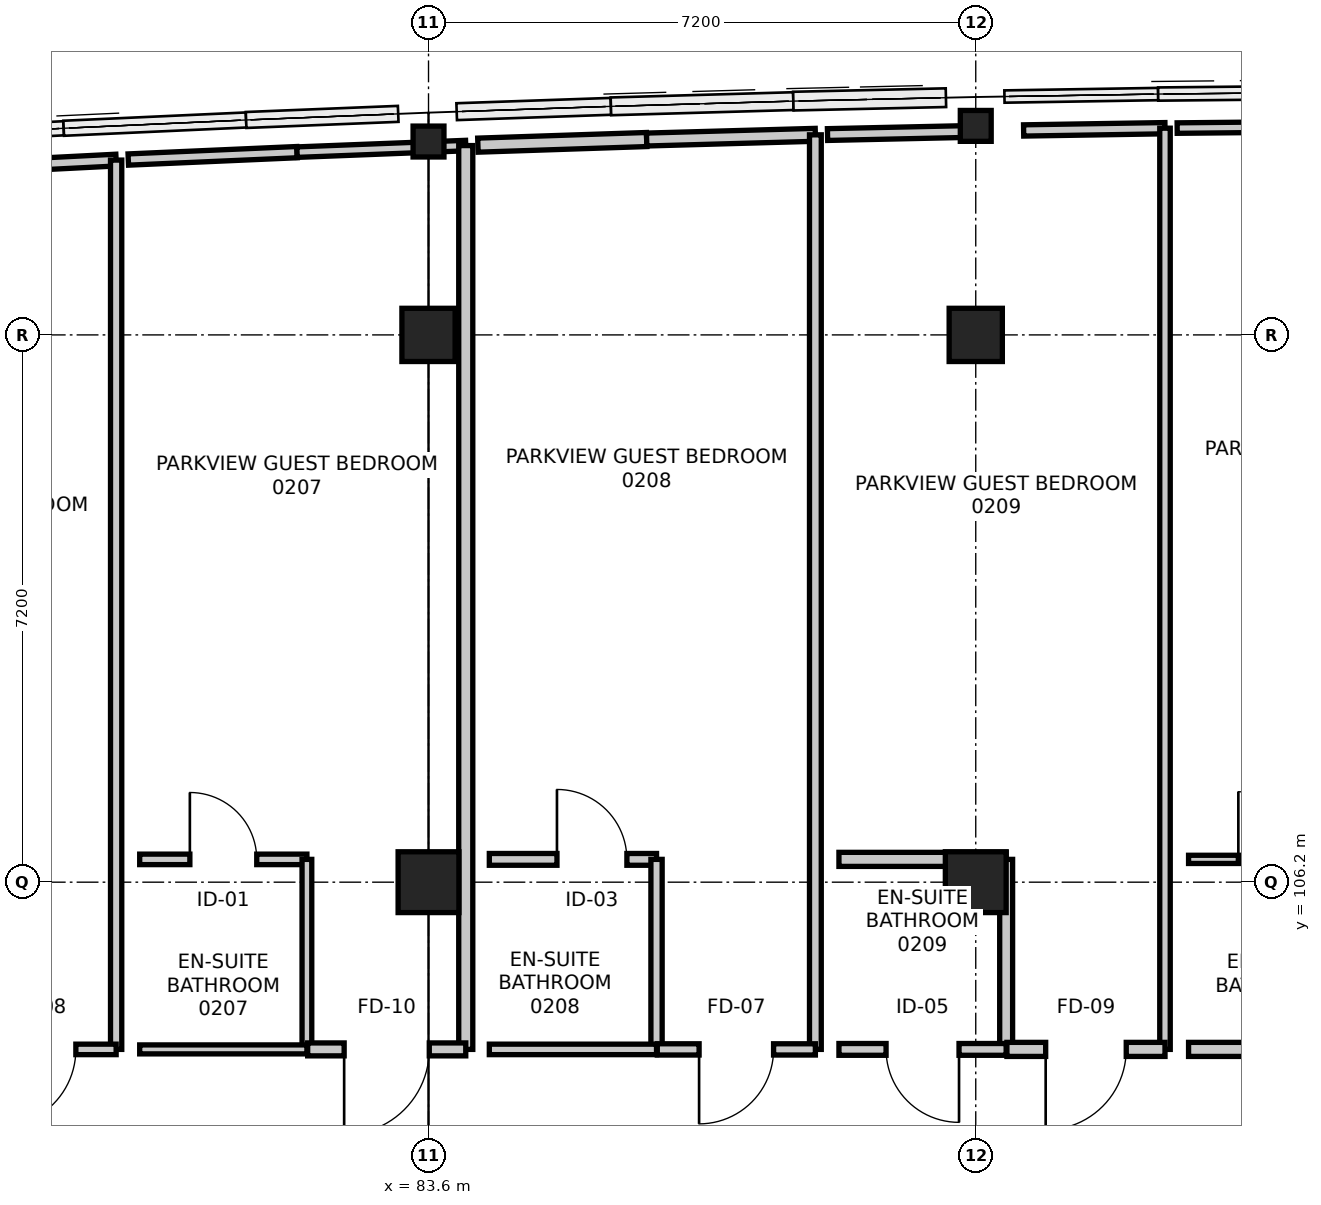
"""IFC4 building model, lengths in metres.
Left out: names, types, materials, properties, quantities, classifications, styles, units other than length and angle.
Written with IfcOpenShell. Run it as: python <this file> out.ifc"""

import sys

from ifc_helpers import new_model, si_unit, direction, frame, frame_2d, origin, origin_2d, place, context, subcontext, project, spatial, rectangle, hollow_circle, extrude, element, fill, save


model = new_model("IFC4")
c1 = context("Model", 3, precision=1e-05, world=origin(), true_north=direction((0.0, 1.0)))
c2 = subcontext(c1, "Body", "Model", "MODEL_VIEW")
j1 = project(units=[si_unit("LENGTHUNIT", "METRE"), si_unit("PLANEANGLEUNIT", "RADIAN")], contexts=[c1])
p1 = place(None, origin())
s1 = spatial("IfcSite", under=j1, at=p1, CompositionType="ELEMENT")
p2 = place(p1, origin())
s2 = spatial("IfcBuilding", under=s1, at=p2, CompositionType="ELEMENT")
p3 = place(p2, frame((0.0, 0.0, 10.5)))
s3 = spatial("IfcBuildingStorey", under=s2, at=p3, CompositionType="ELEMENT", Elevation=10.5)
p4 = place(p3, frame((83.6, 106.2, -0.32), z_axis=(0.0, 0.0, 1.0), x_axis=(1.0, 0.0, 0.0)))
e1 = element("IfcColumn", 1, at=p4, inside=s3, PredefinedType="COLUMN", context=c2, shape_type="SweptSolid", body=[
    extrude(rectangle(XDim=0.8, YDim=0.8, at=origin_2d()), origin(), (0.0, 0.0, 1.0), 4.82),
])
p5 = place(p3, frame((83.6, 113.4, 0.0), z_axis=(0.0, 0.0, 1.0), x_axis=(1.0, 0.0, 0.0)))
e2 = element("IfcColumn", 2, at=p5, inside=s3, PredefinedType="COLUMN", context=c2, shape_type="SweptSolid", body=[
    extrude(rectangle(XDim=0.7, YDim=0.7, at=origin_2d()), origin(), (0.0, 0.0, 1.0), 4.5),
])
p6 = place(p3, frame((83.6, 115.944, 0.0), z_axis=(0.0, 0.0, 1.0), x_axis=(1.0, 0.0, 0.0)))
e3 = element("IfcColumn", 3, at=p6, inside=s3, PredefinedType="COLUMN", context=c2, shape_type="SweptSolid", body=[
    extrude(hollow_circle(Radius=0.203, WallThickness=0.02, at=origin_2d()), origin(), (0.0, 0.0, 1.0), 4.5),
])
p7 = place(p3, frame((90.8, 106.2, 0.0), z_axis=(0.0, 0.0, 1.0), x_axis=(1.0, 0.0, 0.0)))
e4 = element("IfcColumn", 4, at=p7, inside=s3, PredefinedType="COLUMN", context=c2, shape_type="SweptSolid", body=[
    extrude(rectangle(XDim=0.8, YDim=0.8, at=origin_2d()), origin(), (0.0, 0.0, 1.0), 4.5),
])
p8 = place(p3, frame((90.8, 113.4, 0.0), z_axis=(0.0, 0.0, 1.0), x_axis=(1.0, 0.0, 0.0)))
e5 = element("IfcColumn", 5, at=p8, inside=s3, PredefinedType="COLUMN", context=c2, shape_type="SweptSolid", body=[
    extrude(rectangle(XDim=0.7, YDim=0.7, at=origin_2d()), origin(), (0.0, 0.0, 1.0), 4.5),
])
p9 = place(p3, frame((90.8, 116.15, 0.0), z_axis=(0.0, 0.0, 1.0), x_axis=(1.0, 0.0, 0.0)))
e6 = element("IfcColumn", 6, at=p9, inside=s3, PredefinedType="COLUMN", context=c2, shape_type="SweptSolid", body=[
    extrude(hollow_circle(Radius=0.203, WallThickness=0.02, at=origin_2d()), origin(), (0.0, 0.0, 1.0), 4.5),
])
p10 = place(p3, frame((75.05, 115.473, 0.0), z_axis=(0.0, 0.0, 1.0), x_axis=(0.998700595236, 0.050961957131, 0.0)))
e7 = element("IfcWall", 7, at=p10, inside=s3, PredefinedType="PARTITIONING", context=c2, shape_type="SweptSolid", body=[
    extrude(rectangle(XDim=4.446, YDim=0.155, at=frame_2d((2.223, 0.0))), origin(), (0.0, 0.0, 1.0), 3.796),
])
p11 = place(p3, frame((79.49, 115.7, 0.0), z_axis=(0.0, 0.0, 1.0), x_axis=(0.0, -1.0, 0.0)))
e8 = element("IfcWall", 8, at=p11, inside=s3, PredefinedType="PARTITIONING", context=c2, shape_type="SweptSolid", body=[
    extrude(rectangle(XDim=11.7, YDim=0.148, at=frame_2d((5.85, 0.0))), origin(), (0.0, 0.0, 1.0), 3.455),
])
p12 = place(p3, frame((79.49, 104.0, 0.0), z_axis=(0.0, 0.0, 1.0), x_axis=(-1.0, 0.0, 0.0)))
e9 = element("IfcWall", 9, at=p12, inside=s3, PredefinedType="PARTITIONING", context=c2, shape_type="SweptSolid", body=[
    extrude(rectangle(XDim=2.08, YDim=0.138, at=frame_2d((1.04, 0.0))), origin(), (0.0, 0.0, 1.0), 4.22),
])
p13 = place(p12, frame((0.53, 0.0, 0.0)))
e10 = element("IfcOpeningElement", 10, at=p13, cuts=e9, PredefinedType="OPENING", context=c2, shape_type="SweptSolid", body=[
    extrude(rectangle(XDim=1.02, YDim=2.15, at=frame_2d((0.51, 1.075))), frame((0.0, 0.079, 0.0), z_axis=(0.0, -1.0, 0.0), x_axis=(1.0, 0.0, 0.0)), (0.0, 0.0, 1.0), 0.158),
])
p14 = place(p3, frame((79.8, 106.5, 0.0), z_axis=(0.0, 0.0, 1.0), x_axis=(1.0, 0.0, 0.0)))
e11 = element("IfcWall", 11, at=p14, inside=s3, PredefinedType="PARTITIONING", context=c2, shape_type="SweptSolid", body=[
    extrude(rectangle(XDim=2.2, YDim=0.138, at=frame_2d((1.1, 0.0))), origin(), (0.0, 0.0, 1.0), 3.455),
])
p15 = place(p14, frame((0.66, 0.0, 0.0)))
e12 = element("IfcOpeningElement", 12, at=p15, cuts=e11, PredefinedType="OPENING", context=c2, shape_type="SweptSolid", body=[
    extrude(rectangle(XDim=0.88, YDim=2.06, at=frame_2d((0.44, 1.03))), frame((0.0, 0.079, 0.0), z_axis=(0.0, -1.0, 0.0), x_axis=(1.0, 0.0, 0.0)), (0.0, 0.0, 1.0), 0.158),
])
p16 = place(p3, frame((82.0, 106.5, 0.0), z_axis=(0.0, 0.0, 1.0), x_axis=(0.0, -1.0, 0.0)))
e13 = element("IfcWall", 13, at=p16, inside=s3, PredefinedType="PARTITIONING", context=c2, shape_type="SweptSolid", body=[
    extrude(rectangle(XDim=2.5, YDim=0.128, at=frame_2d((1.25, 0.0))), origin(), (0.0, 0.0, 1.0), 3.455),
])
p17 = place(p3, frame((82.0, 104.0, 0.0), z_axis=(0.0, 0.0, 1.0), x_axis=(-1.0, 0.0, 0.0)))
e14 = element("IfcWall", 14, at=p17, inside=s3, PredefinedType="PARTITIONING", context=c2, shape_type="SweptSolid", body=[
    extrude(rectangle(XDim=2.2, YDim=0.118, at=frame_2d((1.1, 0.0))), origin(), (0.0, 0.0, 1.0), 4.22),
])
p18 = place(p3, frame((79.65, 115.707, 0.0), z_axis=(0.0, 0.0, 1.0), x_axis=(0.999038875986, 0.043832913077, 0.0)))
e15 = element("IfcWall", 15, at=p18, inside=s3, PredefinedType="PARTITIONING", context=c2, shape_type="SweptSolid", body=[
    extrude(rectangle(XDim=2.222, YDim=0.148, at=frame_2d((1.111, 0.0))), origin(), (0.0, 0.0, 1.0), 3.796),
])
p19 = place(p3, frame((81.87, 115.804, 0.0), z_axis=(0.0, 0.0, 1.0), x_axis=(0.999243047169, 0.038901576894, 0.0)))
e16 = element("IfcWall", 16, at=p19, inside=s3, PredefinedType="PARTITIONING", context=c2, shape_type="SweptSolid", body=[
    extrude(rectangle(XDim=2.222, YDim=0.138, at=frame_2d((1.111, 0.0))), origin(), (0.0, 0.0, 1.0), 3.796),
])
p20 = place(p3, frame((84.09, 115.891, 0.0), z_axis=(0.0, 0.0, 1.0), x_axis=(0.0, -1.0, 0.0)))
e17 = element("IfcWall", 17, at=p20, inside=s3, PredefinedType="PARTITIONING", context=c2, shape_type="SweptSolid", body=[
    extrude(rectangle(XDim=11.891, YDim=0.185, at=frame_2d((5.945, 0.0))), origin(), (0.0, 0.0, 1.0), 3.455),
])
p21 = place(p3, frame((84.09, 104.0, 0.0), z_axis=(0.0, 0.0, 1.0), x_axis=(-1.0, 0.0, 0.0)))
e18 = element("IfcWall", 18, at=p21, inside=s3, PredefinedType="PARTITIONING", context=c2, shape_type="SweptSolid", body=[
    extrude(rectangle(XDim=2.08, YDim=0.17, at=frame_2d((1.04, 0.0))), origin(), (0.0, 0.0, 1.0), 3.555),
])
p22 = place(p21, frame((0.48, 0.0, 0.0)))
e19 = element("IfcOpeningElement", 19, at=p22, cuts=e18, PredefinedType="OPENING", context=c2, shape_type="SweptSolid", body=[
    extrude(rectangle(XDim=1.12, YDim=2.2, at=frame_2d((0.56, 1.1))), frame((0.0, 0.095, 0.0), z_axis=(0.0, -1.0, 0.0), x_axis=(1.0, 0.0, 0.0)), (0.0, 0.0, 1.0), 0.19),
])
p23 = place(p3, frame((84.4, 106.5, 0.0), z_axis=(0.0, 0.0, 1.0), x_axis=(1.0, 0.0, 0.0)))
e20 = element("IfcWall", 20, at=p23, inside=s3, PredefinedType="PARTITIONING", context=c2, shape_type="SweptSolid", body=[
    extrude(rectangle(XDim=2.2, YDim=0.155, at=frame_2d((1.1, 0.0))), origin(), (0.0, 0.0, 1.0), 3.455),
])
p24 = place(p23, frame((0.89, 0.0, 0.0)))
e21 = element("IfcOpeningElement", 21, at=p24, cuts=e20, PredefinedType="OPENING", context=c2, shape_type="SweptSolid", body=[
    extrude(rectangle(XDim=0.92, YDim=2.1, at=frame_2d((0.46, 1.05))), frame((0.0, 0.087, 0.0), z_axis=(0.0, -1.0, 0.0), x_axis=(1.0, 0.0, 0.0)), (0.0, 0.0, 1.0), 0.175),
])
p25 = place(p3, frame((86.6, 106.5, 0.0), z_axis=(0.0, 0.0, 1.0), x_axis=(0.0, -1.0, 0.0)))
e22 = element("IfcWall", 22, at=p25, inside=s3, PredefinedType="PARTITIONING", context=c2, shape_type="SweptSolid", body=[
    extrude(rectangle(XDim=2.5, YDim=0.148, at=frame_2d((1.25, 0.0))), origin(), (0.0, 0.0, 1.0), 3.455),
])
p26 = place(p3, frame((86.6, 104.0, 0.0), z_axis=(0.0, 0.0, 1.0), x_axis=(-1.0, 0.0, 0.0)))
e23 = element("IfcWall", 23, at=p26, inside=s3, PredefinedType="PARTITIONING", context=c2, shape_type="SweptSolid", body=[
    extrude(rectangle(XDim=2.2, YDim=0.138, at=frame_2d((1.1, 0.0))), origin(), (0.0, 0.0, 1.0), 4.22),
])
p27 = place(p3, frame((84.25, 115.896, 0.0), z_axis=(0.0, 0.0, 1.0), x_axis=(0.999445272891, 0.03330385106, 0.0)))
e24 = element("IfcWall", 24, at=p27, inside=s3, PredefinedType="PARTITIONING", context=c2, shape_type="SweptSolid", body=[
    extrude(rectangle(XDim=2.221, YDim=0.185, at=frame_2d((1.111, 0.0))), origin(), (0.0, 0.0, 1.0), 3.796),
])
p28 = place(p3, frame((86.47, 115.97, 0.0), z_axis=(0.0, 0.0, 1.0), x_axis=(0.999613148223, 0.027812836963, 0.0)))
e25 = element("IfcWall", 25, at=p28, inside=s3, PredefinedType="PARTITIONING", context=c2, shape_type="SweptSolid", body=[
    extrude(rectangle(XDim=2.221, YDim=0.17, at=frame_2d((1.11, 0.0))), origin(), (0.0, 0.0, 1.0), 3.796),
])
p29 = place(p3, frame((88.69, 116.032, 0.0), z_axis=(0.0, 0.0, 1.0), x_axis=(0.0, -1.0, 0.0)))
e26 = element("IfcWall", 26, at=p29, inside=s3, PredefinedType="PARTITIONING", context=c2, shape_type="SweptSolid", body=[
    extrude(rectangle(XDim=12.032, YDim=0.155, at=frame_2d((6.016, 0.0))), origin(), (0.0, 0.0, 1.0), 3.455),
])
p30 = place(p3, frame((88.69, 104.0, 0.0), z_axis=(0.0, 0.0, 1.0), x_axis=(-1.0, 0.0, 0.0)))
e27 = element("IfcWall", 27, at=p30, inside=s3, PredefinedType="PARTITIONING", context=c2, shape_type="SweptSolid", body=[
    extrude(rectangle(XDim=2.08, YDim=0.148, at=frame_2d((1.04, 0.0))), origin(), (0.0, 0.0, 1.0), 4.22),
])
p31 = place(p30, frame((0.55, 0.0, 0.0)))
e28 = element("IfcOpeningElement", 28, at=p31, cuts=e27, PredefinedType="OPENING", context=c2, shape_type="SweptSolid", body=[
    extrude(rectangle(XDim=0.98, YDim=2.15, at=frame_2d((0.49, 1.075))), frame((0.0, 0.084, 0.0), z_axis=(0.0, -1.0, 0.0), x_axis=(1.0, 0.0, 0.0)), (0.0, 0.0, 1.0), 0.168),
])
p32 = place(p3, frame((89.0, 106.5, 0.0), z_axis=(0.0, 0.0, 1.0), x_axis=(1.0, 0.0, 0.0)))
e29 = element("IfcWall", 29, at=p32, inside=s3, PredefinedType="PARTITIONING", context=c2, shape_type="SweptSolid", body=[
    extrude(rectangle(XDim=2.2, YDim=0.185, at=frame_2d((1.1, 0.0))), origin(), (0.0, 0.0, 1.0), 3.455),
])
p33 = place(p3, frame((91.2, 106.5, 0.0), z_axis=(0.0, 0.0, 1.0), x_axis=(0.0, -1.0, 0.0)))
e30 = element("IfcWall", 30, at=p33, inside=s3, PredefinedType="PARTITIONING", context=c2, shape_type="SweptSolid", body=[
    extrude(rectangle(XDim=2.5, YDim=0.17, at=frame_2d((1.25, 0.0))), origin(), (0.0, 0.0, 1.0), 3.455),
])
p34 = place(p3, frame((91.2, 104.0, 0.0), z_axis=(0.0, 0.0, 1.0), x_axis=(-1.0, 0.0, 0.0)))
e31 = element("IfcWall", 31, at=p34, inside=s3, PredefinedType="PARTITIONING", context=c2, shape_type="SweptSolid", body=[
    extrude(rectangle(XDim=2.2, YDim=0.155, at=frame_2d((1.1, 0.0))), origin(), (0.0, 0.0, 1.0), 3.555),
])
p35 = place(p34, frame((0.62, 0.0, 0.0)))
e32 = element("IfcOpeningElement", 32, at=p35, cuts=e31, PredefinedType="OPENING", context=c2, shape_type="SweptSolid", body=[
    extrude(rectangle(XDim=0.96, YDim=2.14, at=frame_2d((0.48, 1.07))), frame((0.0, 0.087, 0.0), z_axis=(0.0, -1.0, 0.0), x_axis=(1.0, 0.0, 0.0)), (0.0, 0.0, 1.0), 0.175),
])
p36 = place(p3, frame((88.85, 116.036, 0.0), z_axis=(0.0, 0.0, 1.0), x_axis=(0.999762733925, 0.021782466706, 0.0)))
e33 = element("IfcWall", 33, at=p36, inside=s3, PredefinedType="PARTITIONING", context=c2, shape_type="SweptSolid", body=[
    extrude(rectangle(XDim=1.861, YDim=0.155, at=frame_2d((0.93, 0.0))), origin(), (0.0, 0.0, 1.0), 3.796),
])
p37 = place(p3, frame((91.43, 116.09, 0.0), z_axis=(0.0, 0.0, 1.0), x_axis=(0.999871822968, 0.016010547631, 0.0)))
e34 = element("IfcWall", 34, at=p37, inside=s3, PredefinedType="PARTITIONING", context=c2, shape_type="SweptSolid", body=[
    extrude(rectangle(XDim=1.86, YDim=0.148, at=frame_2d((0.93, 0.0))), origin(), (0.0, 0.0, 1.0), 3.796),
])
p38 = place(p3, frame((93.29, 116.12, 0.0), z_axis=(0.0, 0.0, 1.0), x_axis=(0.0, -1.0, 0.0)))
e35 = element("IfcWall", 35, at=p38, inside=s3, PredefinedType="PARTITIONING", context=c2, shape_type="SweptSolid", body=[
    extrude(rectangle(XDim=12.12, YDim=0.138, at=frame_2d((6.06, 0.0))), origin(), (0.0, 0.0, 1.0), 3.455),
])
p39 = place(p3, frame((93.29, 104.0, 0.0), z_axis=(0.0, 0.0, 1.0), x_axis=(-1.0, 0.0, 0.0)))
e36 = element("IfcWall", 36, at=p39, inside=s3, PredefinedType="PARTITIONING", context=c2, shape_type="SweptSolid", body=[
    extrude(rectangle(XDim=2.08, YDim=0.185, at=frame_2d((1.04, 0.0))), origin(), (0.0, 0.0, 1.0), 4.22),
])
p40 = place(p39, frame((0.51, 0.0, 0.0)))
e37 = element("IfcOpeningElement", 37, at=p40, cuts=e36, PredefinedType="OPENING", context=c2, shape_type="SweptSolid", body=[
    extrude(rectangle(XDim=1.06, YDim=2.2, at=frame_2d((0.53, 1.1))), frame((0.0, 0.103, 0.0), z_axis=(0.0, -1.0, 0.0), x_axis=(1.0, 0.0, 0.0)), (0.0, 0.0, 1.0), 0.205),
])
p41 = place(p3, frame((93.6, 106.5, 0.0), z_axis=(0.0, 0.0, 1.0), x_axis=(1.0, 0.0, 0.0)))
e38 = element("IfcWall", 38, at=p41, inside=s3, PredefinedType="PARTITIONING", context=c2, shape_type="SweptSolid", body=[
    extrude(rectangle(XDim=2.2, YDim=0.108, at=frame_2d((1.1, 0.0))), origin(), (0.0, 0.0, 1.0), 3.455),
])
p42 = place(p41, frame((0.655, 0.0, 0.0)))
e39 = element("IfcOpeningElement", 39, at=p42, cuts=e38, PredefinedType="OPENING", context=c2, shape_type="SweptSolid", body=[
    extrude(rectangle(XDim=0.89, YDim=2.09, at=frame_2d((0.445, 1.045))), frame((0.0, 0.064, 0.0), z_axis=(0.0, -1.0, 0.0), x_axis=(1.0, 0.0, 0.0)), (0.0, 0.0, 1.0), 0.128),
])
p43 = place(p3, frame((95.8, 104.0, 0.0), z_axis=(0.0, 0.0, 1.0), x_axis=(-1.0, 0.0, 0.0)))
e40 = element("IfcWall", 40, at=p43, inside=s3, PredefinedType="PARTITIONING", context=c2, shape_type="SweptSolid", body=[
    extrude(rectangle(XDim=2.2, YDim=0.185, at=frame_2d((1.1, 0.0))), origin(), (0.0, 0.0, 1.0), 4.22),
])
p44 = place(p3, frame((93.45, 116.121, 0.0), z_axis=(0.0, 0.0, 1.0), x_axis=(0.99995423175, 0.009567361505, 0.0)))
e41 = element("IfcWall", 41, at=p44, inside=s3, PredefinedType="PARTITIONING", context=c2, shape_type="SweptSolid", body=[
    extrude(rectangle(XDim=2.22, YDim=0.138, at=frame_2d((1.11, 0.0))), origin(), (0.0, 0.0, 1.0), 3.796),
])
p45 = place(p13, origin())
e42 = element("IfcDoor", 42, at=p45, inside=s3, OperationType="SINGLE_SWING_RIGHT", PredefinedType="DOOR", context=c2, shape_type="SweptSolid", body=[
    extrude(rectangle(XDim=1.02, YDim=2.15, at=frame_2d((0.51, 1.075))), frame((0.0, 0.025, 0.0), z_axis=(0.0, -1.0, 0.0), x_axis=(1.0, 0.0, 0.0)), (0.0, 0.0, 1.0), 0.05),
])
fill(e10, e42)
p46 = place(p15, origin())
e43 = element("IfcDoor", 43, at=p46, inside=s3, OperationType="SINGLE_SWING_LEFT", PredefinedType="DOOR", context=c2, shape_type="SweptSolid", body=[
    extrude(rectangle(XDim=0.88, YDim=2.06, at=frame_2d((0.44, 1.03))), frame((0.0, 0.025, 0.0), z_axis=(0.0, -1.0, 0.0), x_axis=(1.0, 0.0, 0.0)), (0.0, 0.0, 1.0), 0.05),
])
fill(e12, e43)
p47 = place(p22, origin())
e44 = element("IfcDoor", 44, at=p47, inside=s3, OperationType="SINGLE_SWING_RIGHT", PredefinedType="DOOR", context=c2, shape_type="SweptSolid", body=[
    extrude(rectangle(XDim=1.12, YDim=2.2, at=frame_2d((0.56, 1.1))), frame((0.0, 0.025, 0.0), z_axis=(0.0, -1.0, 0.0), x_axis=(1.0, 0.0, 0.0)), (0.0, 0.0, 1.0), 0.05),
])
fill(e19, e44)
p48 = place(p24, origin())
e45 = element("IfcDoor", 45, at=p48, inside=s3, OperationType="SINGLE_SWING_LEFT", PredefinedType="DOOR", context=c2, shape_type="SweptSolid", body=[
    extrude(rectangle(XDim=0.92, YDim=2.1, at=frame_2d((0.46, 1.05))), frame((0.0, 0.025, 0.0), z_axis=(0.0, -1.0, 0.0), x_axis=(1.0, 0.0, 0.0)), (0.0, 0.0, 1.0), 0.05),
])
fill(e21, e45)
p49 = place(p31, origin())
e46 = element("IfcDoor", 46, at=p49, inside=s3, OperationType="SINGLE_SWING_RIGHT", PredefinedType="DOOR", context=c2, shape_type="SweptSolid", body=[
    extrude(rectangle(XDim=0.98, YDim=2.15, at=frame_2d((0.49, 1.075))), frame((0.0, 0.025, 0.0), z_axis=(0.0, -1.0, 0.0), x_axis=(1.0, 0.0, 0.0)), (0.0, 0.0, 1.0), 0.05),
])
fill(e28, e46)
p50 = place(p35, origin())
e47 = element("IfcDoor", 47, at=p50, inside=s3, OperationType="SINGLE_SWING_LEFT", PredefinedType="DOOR", context=c2, shape_type="SweptSolid", body=[
    extrude(rectangle(XDim=0.96, YDim=2.14, at=frame_2d((0.48, 1.07))), frame((0.0, 0.025, 0.0), z_axis=(0.0, -1.0, 0.0), x_axis=(1.0, 0.0, 0.0)), (0.0, 0.0, 1.0), 0.05),
])
fill(e32, e47)
p51 = place(p40, origin())
e48 = element("IfcDoor", 48, at=p51, inside=s3, OperationType="SINGLE_SWING_RIGHT", PredefinedType="DOOR", context=c2, shape_type="SweptSolid", body=[
    extrude(rectangle(XDim=1.06, YDim=2.2, at=frame_2d((0.53, 1.1))), frame((0.0, 0.025, 0.0), z_axis=(0.0, -1.0, 0.0), x_axis=(1.0, 0.0, 0.0)), (0.0, 0.0, 1.0), 0.05),
])
fill(e37, e48)
p52 = place(p42, origin())
e49 = element("IfcDoor", 49, at=p52, inside=s3, OperationType="SINGLE_SWING_LEFT", PredefinedType="DOOR", context=c2, shape_type="SweptSolid", body=[
    extrude(rectangle(XDim=0.89, YDim=2.09, at=frame_2d((0.445, 1.045))), frame((0.0, 0.025, 0.0), z_axis=(0.0, -1.0, 0.0), x_axis=(1.0, 0.0, 0.0)), (0.0, 0.0, 1.0), 0.05),
])
fill(e39, e49)
save(model, sys.argv[1])
